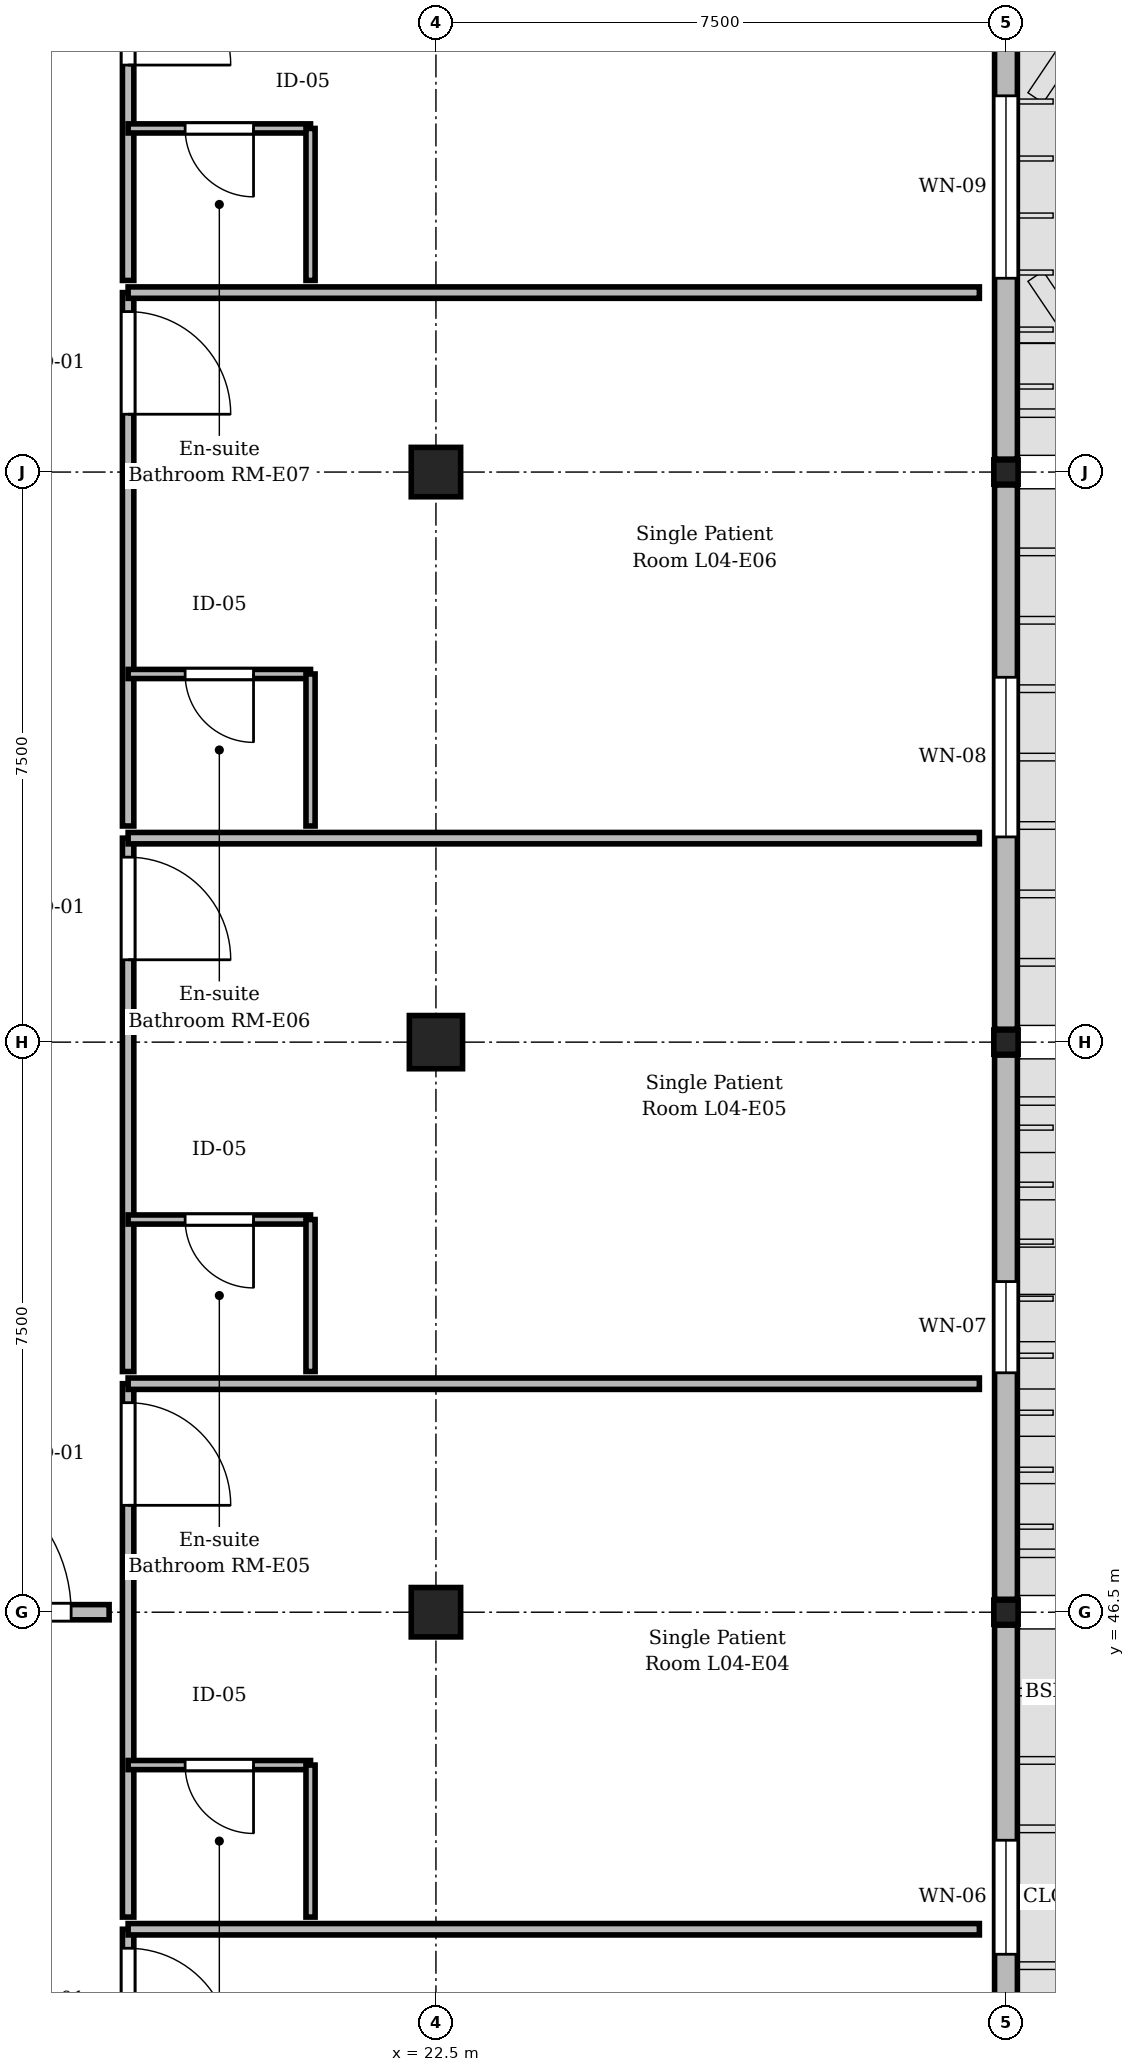
"""IFC4 building model, lengths in metres.
Left out: names, types, materials, properties, quantities, classifications, styles, units other than length and angle.
Written with IfcOpenShell. Run it as: python <this file> out.ifc"""

import sys

from ifc_helpers import new_model, si_unit, direction, frame, frame_2d, origin, origin_2d, place, context, subcontext, project, spatial, rectangle, extrude, element, fill, save


model = new_model("IFC4")
c1 = context("Model", 3, precision=1e-05, world=origin(), true_north=direction((0.0, 1.0)))
c2 = subcontext(c1, "Body", "Model", "MODEL_VIEW")
j1 = project(units=[si_unit("LENGTHUNIT", "METRE"), si_unit("PLANEANGLEUNIT", "RADIAN")], contexts=[c1])
p1 = place(None, origin())
s1 = spatial("IfcSite", under=j1, at=p1, CompositionType="ELEMENT")
p2 = place(p1, origin())
s2 = spatial("IfcBuilding", under=s1, at=p2, CompositionType="ELEMENT")
p3 = place(p2, frame((0.0, 0.0, 17.85)))
s3 = spatial("IfcBuildingStorey", under=s2, at=p3, CompositionType="ELEMENT", Elevation=17.85)
p4 = place(p3, frame((22.5, 46.5, 0.0), z_axis=(0.0, 0.0, 1.0), x_axis=(1.0, 0.0, 0.0)))
e1 = element("IfcColumn", 1, at=p4, inside=s3, PredefinedType="COLUMN", context=c2, shape_type="SweptSolid", body=[
    extrude(rectangle(XDim=0.65, YDim=0.65, at=origin_2d()), origin(), (0.0, 0.0, 1.0), 4.05),
])
p5 = place(p3, frame((22.5, 54.0, 0.0), z_axis=(0.0, 0.0, 1.0), x_axis=(1.0, 0.0, 0.0)))
e2 = element("IfcColumn", 2, at=p5, inside=s3, PredefinedType="COLUMN", context=c2, shape_type="SweptSolid", body=[
    extrude(rectangle(XDim=0.7, YDim=0.7, at=origin_2d()), origin(), (0.0, 0.0, 1.0), 4.05),
])
p6 = place(p3, frame((22.5, 61.5, 0.0), z_axis=(0.0, 0.0, 1.0), x_axis=(1.0, 0.0, 0.0)))
e3 = element("IfcColumn", 3, at=p6, inside=s3, PredefinedType="COLUMN", context=c2, shape_type="SweptSolid", body=[
    extrude(rectangle(XDim=0.65, YDim=0.65, at=origin_2d()), origin(), (0.0, 0.0, 1.0), 4.05),
])
for number, where, z_axis, x_axis in (
    (4, (30.0, 46.5, 0.0), (0.0, 0.0, 1.0), (1.0, 0.0, 0.0)),
    (5, (30.0, 54.0, 0.0), (0.0, 0.0, 1.0), (1.0, 0.0, 0.0)),
    (6, (30.0, 61.5, 0.0), (0.0, 0.0, 1.0), (1.0, 0.0, 0.0)),
):
    element("IfcColumn", number, at=place(p3, frame(where, z_axis=z_axis, x_axis=x_axis)), inside=s3, PredefinedType="COLUMN", context=c2, shape_type="SweptSolid", body=[
        extrude(rectangle(XDim=0.32, YDim=0.32, at=origin_2d()), origin(), (0.0, 0.0, 1.0), 4.05),
    ])
p7 = place(p3, frame((30.0, 46.33, 0.0), z_axis=(0.0, 0.0, 1.0), x_axis=(0.0, -1.0, 0.0)))
e7 = element("IfcWall", 7, at=p7, inside=s3, PredefinedType="STANDARD", context=c2, shape_type="SweptSolid", body=[
    extrude(rectangle(XDim=7.16, YDim=0.3, at=frame_2d((3.58, 0.0))), origin(), (0.0, 0.0, 1.0), 3.17),
])
p8 = place(p7, frame((2.83, 0.0, 0.9)))
e8 = element("IfcOpeningElement", 8, at=p8, cuts=e7, PredefinedType="OPENING", context=c2, shape_type="SweptSolid", body=[
    extrude(rectangle(XDim=1.5, YDim=1.99, at=frame_2d((0.75, 0.995))), frame((0.0, 0.16, 0.0), z_axis=(0.0, -1.0, 0.0), x_axis=(1.0, 0.0, 0.0)), (0.0, 0.0, 1.0), 0.32),
])
p9 = place(p3, frame((30.0, 53.83, 0.0), z_axis=(0.0, 0.0, 1.0), x_axis=(0.0, -1.0, 0.0)))
e9 = element("IfcWall", 9, at=p9, inside=s3, PredefinedType="STANDARD", context=c2, shape_type="SweptSolid", body=[
    extrude(rectangle(XDim=7.16, YDim=0.3, at=frame_2d((3.58, 0.0))), origin(), (0.0, 0.0, 1.0), 3.17),
])
p10 = place(p9, frame((2.98, 0.0, 0.9)))
e10 = element("IfcOpeningElement", 10, at=p10, cuts=e9, PredefinedType="OPENING", context=c2, shape_type="SweptSolid", body=[
    extrude(rectangle(XDim=1.2, YDim=1.99, at=frame_2d((0.6, 0.995))), frame((0.0, 0.16, 0.0), z_axis=(0.0, -1.0, 0.0), x_axis=(1.0, 0.0, 0.0)), (0.0, 0.0, 1.0), 0.32),
])
p11 = place(p3, frame((30.0, 61.33, 0.0), z_axis=(0.0, 0.0, 1.0), x_axis=(0.0, -1.0, 0.0)))
e11 = element("IfcWall", 11, at=p11, inside=s3, PredefinedType="STANDARD", context=c2, shape_type="SweptSolid", body=[
    extrude(rectangle(XDim=7.16, YDim=0.3, at=frame_2d((3.58, 0.0))), origin(), (0.0, 0.0, 1.0), 3.17),
])
p12 = place(p11, frame((2.53, 0.0, 0.9)))
e12 = element("IfcOpeningElement", 12, at=p12, cuts=e11, PredefinedType="OPENING", context=c2, shape_type="SweptSolid", body=[
    extrude(rectangle(XDim=2.1, YDim=1.99, at=frame_2d((1.05, 0.995))), frame((0.0, 0.16, 0.0), z_axis=(0.0, -1.0, 0.0), x_axis=(1.0, 0.0, 0.0)), (0.0, 0.0, 1.0), 0.32),
])
p13 = place(p3, frame((30.0, 68.83, 0.0), z_axis=(0.0, 0.0, 1.0), x_axis=(0.0, -1.0, 0.0)))
e13 = element("IfcWall", 13, at=p13, inside=s3, PredefinedType="STANDARD", context=c2, shape_type="SweptSolid", body=[
    extrude(rectangle(XDim=7.16, YDim=0.3, at=frame_2d((3.58, 0.0))), origin(), (0.0, 0.0, 1.0), 3.17),
])
p14 = place(p13, frame((2.38, 0.0, 0.9)))
e14 = element("IfcOpeningElement", 14, at=p14, cuts=e13, PredefinedType="OPENING", context=c2, shape_type="SweptSolid", body=[
    extrude(rectangle(XDim=2.4, YDim=1.99, at=frame_2d((1.2, 0.995))), frame((0.0, 0.16, 0.0), z_axis=(0.0, -1.0, 0.0), x_axis=(1.0, 0.0, 0.0)), (0.0, 0.0, 1.0), 0.32),
])
p15 = place(p3, frame((18.45, 42.329, 0.0), z_axis=(0.0, 0.0, 1.0), x_axis=(0.0, -1.0, 0.0)))
e15 = element("IfcWall", 15, at=p15, inside=s3, PredefinedType="PARTITIONING", context=c2, shape_type="SweptSolid", body=[
    extrude(rectangle(XDim=7.017, YDim=0.15, at=frame_2d((3.509, 0.0))), origin(), (0.0, 0.0, 1.0), 3.755),
])
p16 = place(p15, frame((0.25, 0.0, 0.0)))
e16 = element("IfcOpeningElement", 16, at=p16, cuts=e15, PredefinedType="OPENING", context=c2, shape_type="SweptSolid", body=[
    extrude(rectangle(XDim=1.35, YDim=2.25, at=frame_2d((0.675, 1.125))), frame((0.0, 0.085, 0.0), z_axis=(0.0, -1.0, 0.0), x_axis=(1.0, 0.0, 0.0)), (0.0, 0.0, 1.0), 0.17),
])
p17 = place(p3, frame((18.45, 49.506, 0.0), z_axis=(0.0, 0.0, 1.0), x_axis=(0.0, -1.0, 0.0)))
e17 = element("IfcWall", 17, at=p17, inside=s3, PredefinedType="PARTITIONING", context=c2, shape_type="SweptSolid", body=[
    extrude(rectangle(XDim=7.017, YDim=0.15, at=frame_2d((3.509, 0.0))), origin(), (0.0, 0.0, 1.0), 3.755),
])
p18 = place(p17, frame((0.25, 0.0, 0.0)))
e18 = element("IfcOpeningElement", 18, at=p18, cuts=e17, PredefinedType="OPENING", context=c2, shape_type="SweptSolid", body=[
    extrude(rectangle(XDim=1.35, YDim=2.25, at=frame_2d((0.675, 1.125))), frame((0.0, 0.085, 0.0), z_axis=(0.0, -1.0, 0.0), x_axis=(1.0, 0.0, 0.0)), (0.0, 0.0, 1.0), 0.17),
])
p19 = place(p3, frame((20.85, 44.489, 0.0), z_axis=(0.0, 0.0, 1.0), x_axis=(-1.0, 0.0, 0.0)))
e19 = element("IfcWall", 19, at=p19, inside=s3, PredefinedType="PARTITIONING", context=c2, shape_type="SweptSolid", body=[
    extrude(rectangle(XDim=2.4, YDim=0.12, at=frame_2d((1.2, 0.0))), origin(), (0.0, 0.0, 1.0), 3.755),
])
p20 = place(p19, frame((0.75, 0.0, 0.0)))
e20 = element("IfcOpeningElement", 20, at=p20, cuts=e19, PredefinedType="OPENING", context=c2, shape_type="SweptSolid", body=[
    extrude(rectangle(XDim=0.9, YDim=2.1, at=frame_2d((0.45, 1.05))), frame((0.0, 0.07, 0.0), z_axis=(0.0, -1.0, 0.0), x_axis=(1.0, 0.0, 0.0)), (0.0, 0.0, 1.0), 0.14),
])
p21 = place(p3, frame((20.85, 42.489, 0.0), z_axis=(0.0, 0.0, 1.0), x_axis=(0.0, 1.0, 0.0)))
e21 = element("IfcWall", 21, at=p21, inside=s3, PredefinedType="PARTITIONING", context=c2, shape_type="SweptSolid", body=[
    extrude(rectangle(XDim=2.0, YDim=0.12, at=frame_2d((1.0, 0.0))), origin(), (0.0, 0.0, 1.0), 3.755),
])
p22 = place(p3, frame((18.45, 56.684, 0.0), z_axis=(0.0, 0.0, 1.0), x_axis=(0.0, -1.0, 0.0)))
e22 = element("IfcWall", 22, at=p22, inside=s3, PredefinedType="PARTITIONING", context=c2, shape_type="SweptSolid", body=[
    extrude(rectangle(XDim=7.017, YDim=0.15, at=frame_2d((3.509, 0.0))), origin(), (0.0, 0.0, 1.0), 3.755),
])
p23 = place(p22, frame((0.25, 0.0, 0.0)))
e23 = element("IfcOpeningElement", 23, at=p23, cuts=e22, PredefinedType="OPENING", context=c2, shape_type="SweptSolid", body=[
    extrude(rectangle(XDim=1.35, YDim=2.25, at=frame_2d((0.675, 1.125))), frame((0.0, 0.085, 0.0), z_axis=(0.0, -1.0, 0.0), x_axis=(1.0, 0.0, 0.0)), (0.0, 0.0, 1.0), 0.17),
])
p24 = place(p3, frame((20.85, 51.667, 0.0), z_axis=(0.0, 0.0, 1.0), x_axis=(-1.0, 0.0, 0.0)))
e24 = element("IfcWall", 24, at=p24, inside=s3, PredefinedType="PARTITIONING", context=c2, shape_type="SweptSolid", body=[
    extrude(rectangle(XDim=2.4, YDim=0.12, at=frame_2d((1.2, 0.0))), origin(), (0.0, 0.0, 1.0), 3.755),
])
p25 = place(p24, frame((0.75, 0.0, 0.0)))
e25 = element("IfcOpeningElement", 25, at=p25, cuts=e24, PredefinedType="OPENING", context=c2, shape_type="SweptSolid", body=[
    extrude(rectangle(XDim=0.9, YDim=2.1, at=frame_2d((0.45, 1.05))), frame((0.0, 0.07, 0.0), z_axis=(0.0, -1.0, 0.0), x_axis=(1.0, 0.0, 0.0)), (0.0, 0.0, 1.0), 0.14),
])
p26 = place(p3, frame((20.85, 49.667, 0.0), z_axis=(0.0, 0.0, 1.0), x_axis=(0.0, 1.0, 0.0)))
e26 = element("IfcWall", 26, at=p26, inside=s3, PredefinedType="PARTITIONING", context=c2, shape_type="SweptSolid", body=[
    extrude(rectangle(XDim=2.0, YDim=0.12, at=frame_2d((1.0, 0.0))), origin(), (0.0, 0.0, 1.0), 3.755),
])
p27 = place(p3, frame((18.45, 63.861, 0.0), z_axis=(0.0, 0.0, 1.0), x_axis=(0.0, -1.0, 0.0)))
e27 = element("IfcWall", 27, at=p27, inside=s3, PredefinedType="PARTITIONING", context=c2, shape_type="SweptSolid", body=[
    extrude(rectangle(XDim=7.017, YDim=0.15, at=frame_2d((3.509, 0.0))), origin(), (0.0, 0.0, 1.0), 3.755),
])
p28 = place(p27, frame((0.25, 0.0, 0.0)))
e28 = element("IfcOpeningElement", 28, at=p28, cuts=e27, PredefinedType="OPENING", context=c2, shape_type="SweptSolid", body=[
    extrude(rectangle(XDim=1.35, YDim=2.25, at=frame_2d((0.675, 1.125))), frame((0.0, 0.085, 0.0), z_axis=(0.0, -1.0, 0.0), x_axis=(1.0, 0.0, 0.0)), (0.0, 0.0, 1.0), 0.17),
])
p29 = place(p3, frame((20.85, 58.844, 0.0), z_axis=(0.0, 0.0, 1.0), x_axis=(-1.0, 0.0, 0.0)))
e29 = element("IfcWall", 29, at=p29, inside=s3, PredefinedType="PARTITIONING", context=c2, shape_type="SweptSolid", body=[
    extrude(rectangle(XDim=2.4, YDim=0.12, at=frame_2d((1.2, 0.0))), origin(), (0.0, 0.0, 1.0), 3.755),
])
p30 = place(p29, frame((0.75, 0.0, 0.0)))
e30 = element("IfcOpeningElement", 30, at=p30, cuts=e29, PredefinedType="OPENING", context=c2, shape_type="SweptSolid", body=[
    extrude(rectangle(XDim=0.9, YDim=2.1, at=frame_2d((0.45, 1.05))), frame((0.0, 0.07, 0.0), z_axis=(0.0, -1.0, 0.0), x_axis=(1.0, 0.0, 0.0)), (0.0, 0.0, 1.0), 0.14),
])
p31 = place(p3, frame((20.85, 56.844, 0.0), z_axis=(0.0, 0.0, 1.0), x_axis=(0.0, 1.0, 0.0)))
e31 = element("IfcWall", 31, at=p31, inside=s3, PredefinedType="PARTITIONING", context=c2, shape_type="SweptSolid", body=[
    extrude(rectangle(XDim=2.0, YDim=0.12, at=frame_2d((1.0, 0.0))), origin(), (0.0, 0.0, 1.0), 3.755),
])
p32 = place(p3, frame((18.45, 71.038, 0.0), z_axis=(0.0, 0.0, 1.0), x_axis=(0.0, -1.0, 0.0)))
e32 = element("IfcWall", 32, at=p32, inside=s3, PredefinedType="PARTITIONING", context=c2, shape_type="SweptSolid", body=[
    extrude(rectangle(XDim=7.017, YDim=0.15, at=frame_2d((3.509, 0.0))), origin(), (0.0, 0.0, 1.0), 3.755),
])
p33 = place(p32, frame((2.833, 0.0, 0.0)))
e33 = element("IfcOpeningElement", 33, at=p33, cuts=e32, PredefinedType="OPENING", context=c2, shape_type="SweptSolid", body=[
    extrude(rectangle(XDim=1.35, YDim=2.25, at=frame_2d((0.675, 1.125))), frame((0.0, 0.085, 0.0), z_axis=(0.0, -1.0, 0.0), x_axis=(1.0, 0.0, 0.0)), (0.0, 0.0, 1.0), 0.17),
])
p34 = place(p3, frame((20.85, 66.021, 0.0), z_axis=(0.0, 0.0, 1.0), x_axis=(-1.0, 0.0, 0.0)))
e34 = element("IfcWall", 34, at=p34, inside=s3, PredefinedType="PARTITIONING", context=c2, shape_type="SweptSolid", body=[
    extrude(rectangle(XDim=2.4, YDim=0.12, at=frame_2d((1.2, 0.0))), origin(), (0.0, 0.0, 1.0), 3.755),
])
p35 = place(p34, frame((0.75, 0.0, 0.0)))
e35 = element("IfcOpeningElement", 35, at=p35, cuts=e34, PredefinedType="OPENING", context=c2, shape_type="SweptSolid", body=[
    extrude(rectangle(XDim=0.9, YDim=2.1, at=frame_2d((0.45, 1.05))), frame((0.0, 0.07, 0.0), z_axis=(0.0, -1.0, 0.0), x_axis=(1.0, 0.0, 0.0)), (0.0, 0.0, 1.0), 0.14),
])
p36 = place(p3, frame((20.85, 64.021, 0.0), z_axis=(0.0, 0.0, 1.0), x_axis=(0.0, 1.0, 0.0)))
e36 = element("IfcWall", 36, at=p36, inside=s3, PredefinedType="PARTITIONING", context=c2, shape_type="SweptSolid", body=[
    extrude(rectangle(XDim=2.0, YDim=0.12, at=frame_2d((1.0, 0.0))), origin(), (0.0, 0.0, 1.0), 3.755),
])
for number, where, z_axis, x_axis in (
    (37, (18.45, 42.329, 0.0), (0.0, 0.0, 1.0), (1.0, 0.0, 0.0)),
    (38, (18.45, 49.506, 0.0), (0.0, 0.0, 1.0), (1.0, 0.0, 0.0)),
    (39, (18.45, 56.684, 0.0), (0.0, 0.0, 1.0), (1.0, 0.0, 0.0)),
    (40, (18.45, 63.861, 0.0), (0.0, 0.0, 1.0), (1.0, 0.0, 0.0)),
):
    element("IfcWall", number, at=place(p3, frame(where, z_axis=z_axis, x_axis=x_axis)), inside=s3, PredefinedType="PARTITIONING", context=c2, shape_type="SweptSolid", body=[
        extrude(rectangle(XDim=11.2, YDim=0.15, at=frame_2d((5.6, 0.0))), origin(), (0.0, 0.0, 1.0), 3.755),
    ])
p37 = place(p3, frame((15.2, 46.5, 0.0), z_axis=(0.0, 0.0, 1.0), x_axis=(1.0, 0.0, 0.0)))
e41 = element("IfcWall", 41, at=p37, inside=s3, PredefinedType="STANDARD", context=c2, shape_type="SweptSolid", body=[
    extrude(rectangle(XDim=3.0, YDim=0.2, at=frame_2d((1.5, 0.0))), origin(), (0.0, 0.0, 1.0), 3.155),
])
p38 = place(p37, frame((0.5, 0.0, 0.0)))
e42 = element("IfcOpeningElement", 42, at=p38, cuts=e41, PredefinedType="OPENING", context=c2, shape_type="SweptSolid", body=[
    extrude(rectangle(XDim=2.0, YDim=2.3, at=frame_2d((1.0, 1.15))), frame((0.0, 0.11, 0.0), z_axis=(0.0, -1.0, 0.0), x_axis=(1.0, 0.0, 0.0)), (0.0, 0.0, 1.0), 0.22),
])
p39 = place(p8, origin())
e43 = element("IfcWindow", 43, at=p39, inside=s3, PartitioningType="SINGLE_PANEL", PredefinedType="WINDOW", context=c2, shape_type="SweptSolid", body=[
    extrude(rectangle(XDim=1.5, YDim=1.99, at=frame_2d((0.75, 0.995))), frame((0.0, 0.03, 0.0), z_axis=(0.0, -1.0, 0.0), x_axis=(1.0, 0.0, 0.0)), (0.0, 0.0, 1.0), 0.06),
])
fill(e8, e43)
p40 = place(p10, origin())
e44 = element("IfcWindow", 44, at=p40, inside=s3, PartitioningType="SINGLE_PANEL", PredefinedType="WINDOW", context=c2, shape_type="SweptSolid", body=[
    extrude(rectangle(XDim=1.2, YDim=1.99, at=frame_2d((0.6, 0.995))), frame((0.0, 0.03, 0.0), z_axis=(0.0, -1.0, 0.0), x_axis=(1.0, 0.0, 0.0)), (0.0, 0.0, 1.0), 0.06),
])
fill(e10, e44)
p41 = place(p12, origin())
e45 = element("IfcWindow", 45, at=p41, inside=s3, PartitioningType="SINGLE_PANEL", PredefinedType="WINDOW", context=c2, shape_type="SweptSolid", body=[
    extrude(rectangle(XDim=2.1, YDim=1.99, at=frame_2d((1.05, 0.995))), frame((0.0, 0.03, 0.0), z_axis=(0.0, -1.0, 0.0), x_axis=(1.0, 0.0, 0.0)), (0.0, 0.0, 1.0), 0.06),
])
fill(e12, e45)
p42 = place(p14, origin())
e46 = element("IfcWindow", 46, at=p42, inside=s3, PartitioningType="SINGLE_PANEL", PredefinedType="WINDOW", context=c2, shape_type="SweptSolid", body=[
    extrude(rectangle(XDim=2.4, YDim=1.99, at=frame_2d((1.2, 0.995))), frame((0.0, 0.03, 0.0), z_axis=(0.0, -1.0, 0.0), x_axis=(1.0, 0.0, 0.0)), (0.0, 0.0, 1.0), 0.06),
])
fill(e14, e46)
p43 = place(p16, origin())
e47 = element("IfcDoor", 47, at=p43, inside=s3, OperationType="SINGLE_SWING_RIGHT", PredefinedType="DOOR", context=c2, shape_type="SweptSolid", body=[
    extrude(rectangle(XDim=1.35, YDim=2.25, at=frame_2d((0.675, 1.125))), frame((0.0, 0.025, 0.0), z_axis=(0.0, -1.0, 0.0), x_axis=(1.0, 0.0, 0.0)), (0.0, 0.0, 1.0), 0.05),
])
fill(e16, e47)
p44 = place(p18, origin())
e48 = element("IfcDoor", 48, at=p44, inside=s3, OperationType="SINGLE_SWING_RIGHT", PredefinedType="DOOR", context=c2, shape_type="SweptSolid", body=[
    extrude(rectangle(XDim=1.35, YDim=2.25, at=frame_2d((0.675, 1.125))), frame((0.0, 0.025, 0.0), z_axis=(0.0, -1.0, 0.0), x_axis=(1.0, 0.0, 0.0)), (0.0, 0.0, 1.0), 0.05),
])
fill(e18, e48)
p45 = place(p20, origin())
e49 = element("IfcDoor", 49, at=p45, inside=s3, OperationType="SINGLE_SWING_LEFT", PredefinedType="DOOR", context=c2, shape_type="SweptSolid", body=[
    extrude(rectangle(XDim=0.9, YDim=2.1, at=frame_2d((0.45, 1.05))), frame((0.0, 0.025, 0.0), z_axis=(0.0, -1.0, 0.0), x_axis=(1.0, 0.0, 0.0)), (0.0, 0.0, 1.0), 0.05),
])
fill(e20, e49)
p46 = place(p23, origin())
e50 = element("IfcDoor", 50, at=p46, inside=s3, OperationType="SINGLE_SWING_RIGHT", PredefinedType="DOOR", context=c2, shape_type="SweptSolid", body=[
    extrude(rectangle(XDim=1.35, YDim=2.25, at=frame_2d((0.675, 1.125))), frame((0.0, 0.025, 0.0), z_axis=(0.0, -1.0, 0.0), x_axis=(1.0, 0.0, 0.0)), (0.0, 0.0, 1.0), 0.05),
])
fill(e23, e50)
p47 = place(p25, origin())
e51 = element("IfcDoor", 51, at=p47, inside=s3, OperationType="SINGLE_SWING_LEFT", PredefinedType="DOOR", context=c2, shape_type="SweptSolid", body=[
    extrude(rectangle(XDim=0.9, YDim=2.1, at=frame_2d((0.45, 1.05))), frame((0.0, 0.025, 0.0), z_axis=(0.0, -1.0, 0.0), x_axis=(1.0, 0.0, 0.0)), (0.0, 0.0, 1.0), 0.05),
])
fill(e25, e51)
p48 = place(p28, origin())
e52 = element("IfcDoor", 52, at=p48, inside=s3, OperationType="SINGLE_SWING_RIGHT", PredefinedType="DOOR", context=c2, shape_type="SweptSolid", body=[
    extrude(rectangle(XDim=1.35, YDim=2.25, at=frame_2d((0.675, 1.125))), frame((0.0, 0.025, 0.0), z_axis=(0.0, -1.0, 0.0), x_axis=(1.0, 0.0, 0.0)), (0.0, 0.0, 1.0), 0.05),
])
fill(e28, e52)
p49 = place(p30, origin())
e53 = element("IfcDoor", 53, at=p49, inside=s3, OperationType="SINGLE_SWING_LEFT", PredefinedType="DOOR", context=c2, shape_type="SweptSolid", body=[
    extrude(rectangle(XDim=0.9, YDim=2.1, at=frame_2d((0.45, 1.05))), frame((0.0, 0.025, 0.0), z_axis=(0.0, -1.0, 0.0), x_axis=(1.0, 0.0, 0.0)), (0.0, 0.0, 1.0), 0.05),
])
fill(e30, e53)
p50 = place(p33, origin())
e54 = element("IfcDoor", 54, at=p50, inside=s3, OperationType="SINGLE_SWING_RIGHT", PredefinedType="DOOR", context=c2, shape_type="SweptSolid", body=[
    extrude(rectangle(XDim=1.35, YDim=2.25, at=frame_2d((0.675, 1.125))), frame((0.0, 0.025, 0.0), z_axis=(0.0, -1.0, 0.0), x_axis=(1.0, 0.0, 0.0)), (0.0, 0.0, 1.0), 0.05),
])
fill(e33, e54)
p51 = place(p35, origin())
e55 = element("IfcDoor", 55, at=p51, inside=s3, OperationType="SINGLE_SWING_LEFT", PredefinedType="DOOR", context=c2, shape_type="SweptSolid", body=[
    extrude(rectangle(XDim=0.9, YDim=2.1, at=frame_2d((0.45, 1.05))), frame((0.0, 0.025, 0.0), z_axis=(0.0, -1.0, 0.0), x_axis=(1.0, 0.0, 0.0)), (0.0, 0.0, 1.0), 0.05),
])
fill(e35, e55)
p52 = place(p38, origin())
e56 = element("IfcDoor", 56, at=p52, inside=s3, OperationType="DOUBLE_DOOR_SINGLE_SWING", PredefinedType="DOOR", context=c2, shape_type="SweptSolid", body=[
    extrude(rectangle(XDim=2.0, YDim=2.3, at=frame_2d((1.0, 1.15))), frame((0.0, 0.025, 0.0), z_axis=(0.0, -1.0, 0.0), x_axis=(1.0, 0.0, 0.0)), (0.0, 0.0, 1.0), 0.05),
])
fill(e42, e56)
save(model, sys.argv[1])
